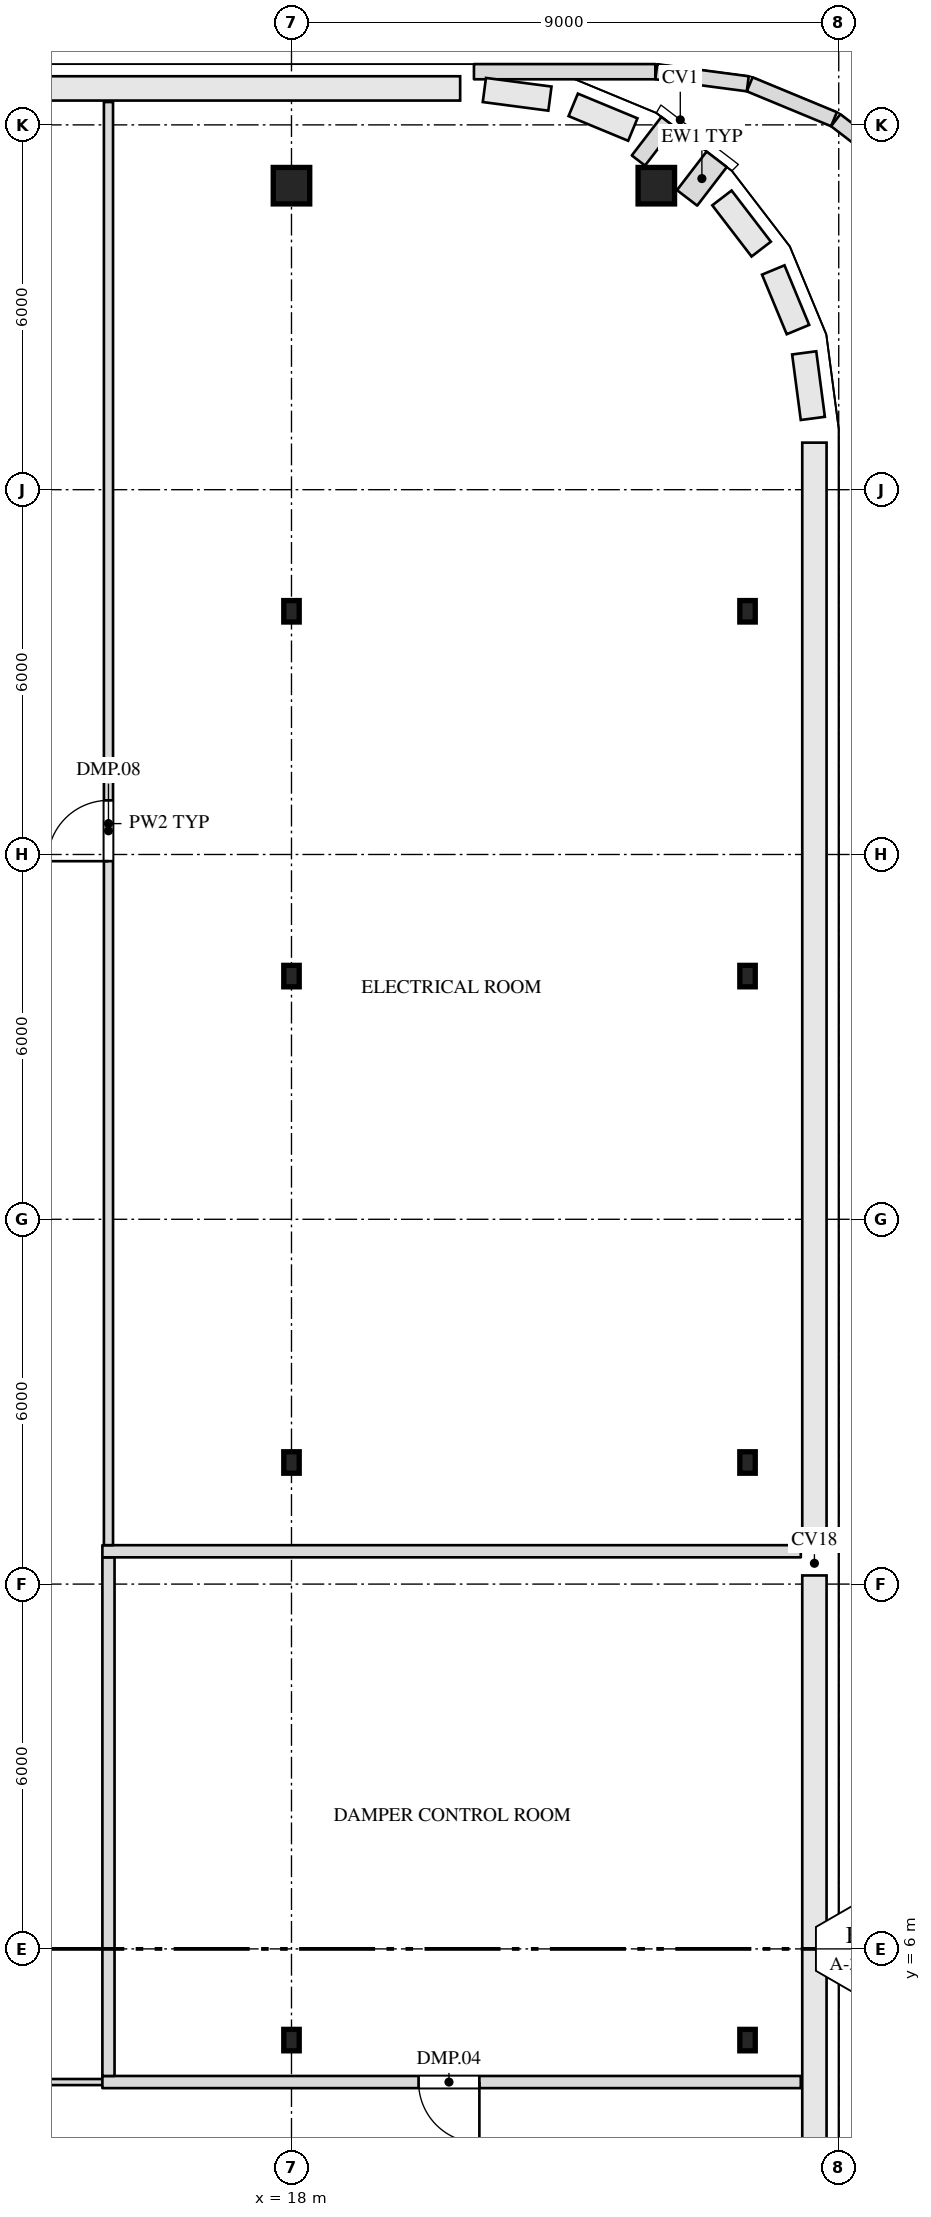
"""IFC4 building model, lengths in metres.
Left out: names, types, materials, properties, quantities, classifications, styles, units other than length and angle.
Written with IfcOpenShell. Run it as: python <this file> out.ifc"""

import sys

from ifc_helpers import new_model, si_unit, direction, frame, frame_2d, origin, origin_2d, place, context, subcontext, project, spatial, rectangle, i_section, extrude, element, fill, save


model = new_model("IFC4")
c1 = context("Model", 3, precision=1e-05, world=origin(), true_north=direction((0.0, 1.0)))
c2 = subcontext(c1, "Body", "Model", "MODEL_VIEW")
j1 = project(units=[si_unit("LENGTHUNIT", "METRE"), si_unit("PLANEANGLEUNIT", "RADIAN")], contexts=[c1])
p1 = place(None, origin())
s1 = spatial("IfcSite", under=j1, at=p1, CompositionType="ELEMENT")
p2 = place(p1, origin())
s2 = spatial("IfcBuilding", under=s1, at=p2, CompositionType="ELEMENT")
p3 = place(p2, frame((0.0, 0.0, 296.5)))
s3 = spatial("IfcBuildingStorey", under=s2, at=p3, CompositionType="ELEMENT", Elevation=296.5)
for number, where, z_axis, x_axis in (
    (1, (18.0, 4.5, 0.0), (0.0, 0.0, 1.0), (1.0, 0.0, 0.0)),
    (2, (25.5, 4.5, 0.0), (0.0, 0.0, 1.0), (1.0, 0.0, 0.0)),
    (3, (18.0, 14.0, 0.0), (0.0, 0.0, 1.0), (1.0, 0.0, 0.0)),
    (4, (25.5, 14.0, 0.0), (0.0, 0.0, 1.0), (1.0, 0.0, 0.0)),
    (5, (18.0, 22.0, 0.0), (0.0, 0.0, 1.0), (1.0, 0.0, 0.0)),
    (6, (25.5, 22.0, 0.0), (0.0, 0.0, 1.0), (1.0, 0.0, 0.0)),
    (7, (18.0, 28.0, 0.0), (0.0, 0.0, 1.0), (1.0, 0.0, 0.0)),
    (8, (25.5, 28.0, 0.0), (0.0, 0.0, 1.0), (1.0, 0.0, 0.0)),
):
    element("IfcColumn", number, at=place(p3, frame(where, z_axis=z_axis, x_axis=x_axis)), inside=s3, PredefinedType="COLUMN", context=c2, shape_type="SweptSolid", body=[
        extrude(i_section(OverallWidth=0.254, OverallDepth=0.353, WebThickness=0.01, FlangeThickness=0.016, at=origin_2d()), origin(), (0.0, 0.0, 1.0), 9.0),
    ])
for number, where, z_axis, x_axis in (
    (9, (18.0, 35.0, 0.0), (0.0, 0.0, 1.0), (1.0, 0.0, 0.0)),
    (10, (24.0, 35.0, 0.0), (0.0, 0.0, 1.0), (1.0, 0.0, 0.0)),
):
    element("IfcColumn", number, at=place(p3, frame(where, z_axis=z_axis, x_axis=x_axis)), inside=s3, PredefinedType="COLUMN", context=c2, shape_type="SweptSolid", body=[
        extrude(rectangle(XDim=0.6, YDim=0.6, at=origin_2d()), origin(), (0.0, 0.0, 1.0), 9.0),
    ])
p4 = place(p3, frame((-15.09, 3.81, 0.0), z_axis=(0.0, 0.0, 1.0), x_axis=(1.0, 0.0, 0.0)))
e11 = element("IfcWall", 11, at=p4, inside=s3, PredefinedType="PARTITIONING", context=c2, shape_type="SweptSolid", body=[
    extrude(rectangle(XDim=30.18, YDim=0.1, at=frame_2d((15.09, 0.0))), origin(), (0.0, 0.0, 1.0), 8.65),
])
p5 = place(p4, frame((3.65, 0.0, 0.0)))
e12 = element("IfcOpeningElement", 12, at=p5, cuts=e11, PredefinedType="OPENING", context=c2, shape_type="SweptSolid", body=[
    extrude(rectangle(XDim=2.0, YDim=2.4, at=frame_2d((1.0, 1.2))), frame((0.0, 0.062, 0.0), z_axis=(0.0, -1.0, 0.0), x_axis=(1.0, 0.0, 0.0)), (0.0, 0.0, 1.0), 0.124),
])
p6 = place(p4, frame((21.65, 0.0, 0.0)))
e13 = element("IfcOpeningElement", 13, at=p6, cuts=e11, PredefinedType="OPENING", context=c2, shape_type="SweptSolid", body=[
    extrude(rectangle(XDim=2.0, YDim=2.4, at=frame_2d((1.0, 1.2))), frame((0.0, 0.062, 0.0), z_axis=(0.0, -1.0, 0.0), x_axis=(1.0, 0.0, 0.0)), (0.0, 0.0, 1.0), 0.124),
])
p7 = place(p3, frame((14.89, 3.81, 0.0), z_axis=(0.0, 0.0, 1.0), x_axis=(1.0, 0.0, 0.0)))
e14 = element("IfcWall", 14, at=p7, inside=s3, PredefinedType="PARTITIONING", context=c2, shape_type="SweptSolid", body=[
    extrude(rectangle(XDim=11.486, YDim=0.2, at=frame_2d((5.743, 0.0))), origin(), (0.0, 0.0, 1.0), 8.65),
])
p8 = place(p7, frame((5.2, 0.0, 0.0)))
e15 = element("IfcOpeningElement", 15, at=p8, cuts=e14, PredefinedType="OPENING", context=c2, shape_type="SweptSolid", body=[
    extrude(rectangle(XDim=1.0, YDim=2.1, at=frame_2d((0.5, 1.05))), frame((0.0, 0.112, 0.0), z_axis=(0.0, -1.0, 0.0), x_axis=(1.0, 0.0, 0.0)), (0.0, 0.0, 1.0), 0.224),
])
p9 = place(p3, frame((14.99, 3.91, 0.0), z_axis=(0.0, 0.0, 1.0), x_axis=(0.0, 1.0, 0.0)))
e16 = element("IfcWall", 16, at=p9, inside=s3, PredefinedType="PARTITIONING", context=c2, shape_type="SweptSolid", body=[
    extrude(rectangle(XDim=8.53, YDim=0.2, at=frame_2d((4.265, 0.0))), origin(), (0.0, 0.0, 1.0), 8.65),
])
p10 = place(p3, frame((14.89, 12.54, 0.0), z_axis=(0.0, 0.0, 1.0), x_axis=(1.0, 0.0, 0.0)))
e17 = element("IfcWall", 17, at=p10, inside=s3, PredefinedType="PARTITIONING", context=c2, shape_type="SweptSolid", body=[
    extrude(rectangle(XDim=11.486, YDim=0.2, at=frame_2d((5.743, 0.0))), origin(), (0.0, 0.0, 1.0), 8.65),
])
p11 = place(p3, frame((14.99, 12.64, 0.0), z_axis=(0.0, 0.0, 1.0), x_axis=(0.0, 1.0, 0.0)))
e18 = element("IfcWall", 18, at=p11, inside=s3, PredefinedType="PARTITIONING", context=c2, shape_type="SweptSolid", body=[
    extrude(rectangle(XDim=23.736, YDim=0.15, at=frame_2d((11.868, 0.0))), origin(), (0.0, 0.0, 1.0), 8.65),
])
p12 = place(p11, frame((11.25, 0.0, 0.0)))
e19 = element("IfcOpeningElement", 19, at=p12, cuts=e18, PredefinedType="OPENING", context=c2, shape_type="SweptSolid", body=[
    extrude(rectangle(XDim=1.0, YDim=2.1, at=frame_2d((0.5, 1.05))), frame((0.0, 0.087, 0.0), z_axis=(0.0, -1.0, 0.0), x_axis=(1.0, 0.0, 0.0)), (0.0, 0.0, 1.0), 0.174),
])
p13 = place(p3, frame((24.916, 34.989, 0.0), z_axis=(0.0, 0.0, 1.0), x_axis=(-0.793165294641, 0.609006416532, 0.0)))
e20 = element("IfcWall", 20, at=p13, inside=s3, PredefinedType="SOLIDWALL", context=c2, shape_type="SweptSolid", body=[
    extrude(rectangle(XDim=0.419, YDim=0.8, at=frame_2d((0.209, 0.0))), origin(), (0.0, 0.0, 1.0), 8.65),
])
p14 = place(p3, frame((24.058, 35.648, 0.0), z_axis=(0.0, 0.0, 1.0), x_axis=(-0.793219322038, 0.608936045201, 0.0)))
e21 = element("IfcWall", 21, at=p14, inside=s3, PredefinedType="SOLIDWALL", context=c2, shape_type="SweptSolid", body=[
    extrude(rectangle(XDim=0.274, YDim=0.8, at=frame_2d((0.137, 0.0))), origin(), (0.0, 0.0, 1.0), 8.65),
])
for number, where, z_axis, x_axis in (
    (22, (28.14, 35.164, 0.0), (0.0, 0.0, 1.0), (-0.793, 0.609, 0.0)),
    (23, (26.922, 36.093, 0.0), (0.0, 0.0, 1.0), (-0.924, 0.383, 0.0)),
):
    element("IfcWall", number, at=place(p3, frame(where, z_axis=z_axis, x_axis=x_axis)), inside=s3, PredefinedType="PARAPET", context=c2, shape_type="SweptSolid", body=[
        extrude(rectangle(XDim=1.5, YDim=0.25, at=frame_2d((0.75, 0.0))), origin(), (0.0, 0.0, 1.0), 1.1),
    ])
p15 = place(p3, frame((25.504, 36.676, 0.0), z_axis=(0.0, 0.0, 1.0), x_axis=(-0.991465248625, 0.130371242108, 0.0)))
e24 = element("IfcWall", 24, at=p15, inside=s3, PredefinedType="PARAPET", context=c2, shape_type="SweptSolid", body=[
    extrude(rectangle(XDim=1.517, YDim=0.25, at=frame_2d((0.758, 0.0))), origin(), (0.0, 0.0, 1.0), 1.1),
])
p16 = place(p3, frame((23.984, 36.875, 0.0), z_axis=(0.0, 0.0, 1.0), x_axis=(-1.0, 0.0, 0.0)))
e25 = element("IfcWall", 25, at=p16, inside=s3, PredefinedType="PARAPET", context=c2, shape_type="SweptSolid", body=[
    extrude(rectangle(XDim=2.983, YDim=0.25, at=frame_2d((1.491, 0.0))), origin(), (0.0, 0.0, 1.0), 1.1),
])
p17 = place(p8, origin())
e26 = element("IfcDoor", 26, at=p17, inside=s3, OperationType="SINGLE_SWING_LEFT", PredefinedType="DOOR", context=c2, shape_type="SweptSolid", body=[
    extrude(rectangle(XDim=1.0, YDim=2.1, at=frame_2d((0.5, 1.05))), frame((0.0, 0.025, 0.0), z_axis=(0.0, -1.0, 0.0), x_axis=(1.0, 0.0, 0.0)), (0.0, 0.0, 1.0), 0.05),
])
fill(e15, e26)
p18 = place(p12, origin())
e27 = element("IfcDoor", 27, at=p18, inside=s3, OperationType="SINGLE_SWING_LEFT", PredefinedType="DOOR", context=c2, shape_type="SweptSolid", body=[
    extrude(rectangle(XDim=1.0, YDim=2.1, at=frame_2d((0.5, 1.05))), frame((0.0, 0.025, 0.0), z_axis=(0.0, -1.0, 0.0), x_axis=(1.0, 0.0, 0.0)), (0.0, 0.0, 1.0), 0.05),
])
fill(e19, e27)
save(model, sys.argv[1])
